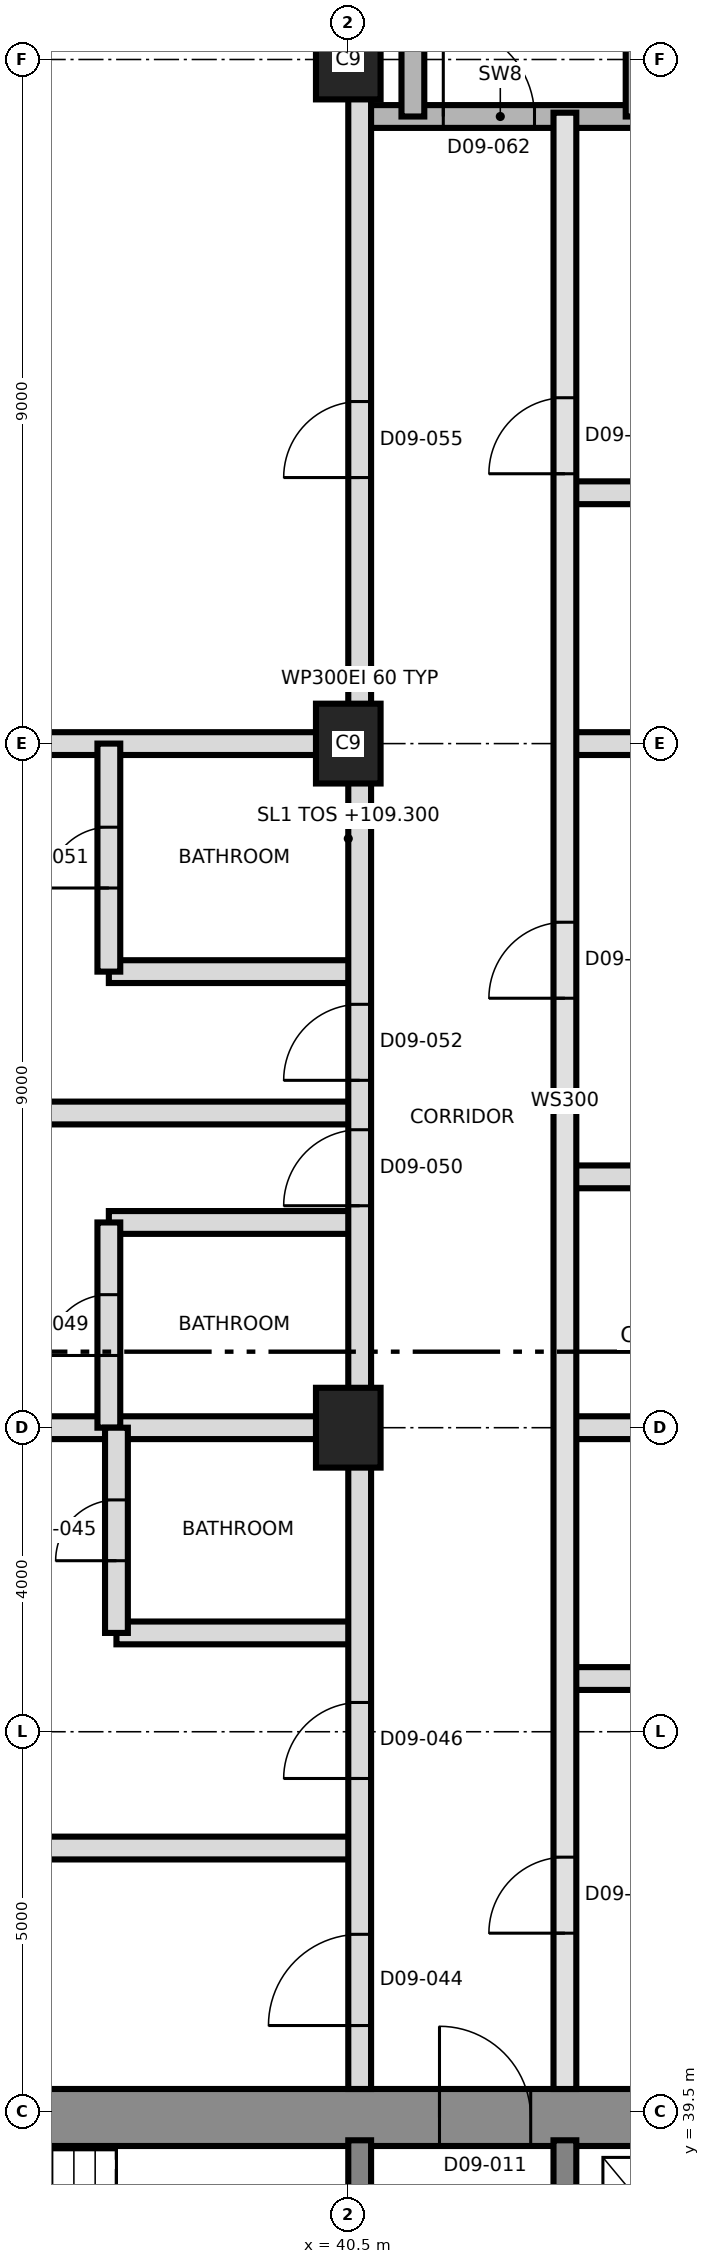
"""IFC4 building model, lengths in metres.
Left out: names, types, materials, properties, quantities, classifications, styles, units other than length and angle.
Written with IfcOpenShell. Run it as: python <this file> out.ifc"""

import sys

from ifc_helpers import new_model, si_unit, direction, frame, frame_2d, origin, origin_2d, place, context, subcontext, project, spatial, rectangle, extrude, element, fill, save


model = new_model("IFC4")
c1 = context("Model", 3, precision=1e-05, world=origin(), true_north=direction((0.0, 1.0)))
c2 = subcontext(c1, "Body", "Model", "MODEL_VIEW")
j1 = project(units=[si_unit("LENGTHUNIT", "METRE"), si_unit("PLANEANGLEUNIT", "RADIAN")], contexts=[c1])
p1 = place(None, origin())
s1 = spatial("IfcSite", under=j1, at=p1, CompositionType="ELEMENT")
p2 = place(p1, origin())
s2 = spatial("IfcBuilding", under=s1, at=p2, CompositionType="ELEMENT")
p3 = place(p2, frame((0.0, 0.0, 109.3)))
s3 = spatial("IfcBuildingStorey", under=s2, at=p3, CompositionType="ELEMENT", Elevation=109.3)
p4 = place(p3, frame((31.125, 39.425, 0.0), z_axis=(0.0, 0.0, 1.0), x_axis=(1.0, 0.0, 0.0)))
e1 = element("IfcWall", 1, at=p4, inside=s3, PredefinedType="SHEAR", context=c2, shape_type="SweptSolid", body=[
    extrude(rectangle(XDim=27.0, YDim=0.75, at=frame_2d((13.5, 0.0))), origin(), (0.0, 0.0, 1.0), 3.7),
])
p5 = place(p4, frame((10.575, 0.0, 0.0)))
e2 = element("IfcOpeningElement", 2, at=p5, cuts=e1, PredefinedType="OPENING", context=c2, shape_type="SweptSolid", body=[
    extrude(rectangle(XDim=1.2, YDim=2.1, at=frame_2d((0.6, 1.05))), frame((0.0, 0.385, 0.0), z_axis=(0.0, -1.0, 0.0), x_axis=(1.0, 0.0, 0.0)), (0.0, 0.0, 1.0), 0.77),
])
for number, where, z_axis, x_axis in (
    (3, (40.65, 33.5, 0.0), (0.0, 0.0, 1.0), (0.0, 1.0, 0.0)),
    (4, (43.35, 33.5, 0.0), (0.0, 0.0, 1.0), (0.0, 1.0, 0.0)),
):
    element("IfcWall", number, at=place(p3, frame(where, z_axis=z_axis, x_axis=x_axis)), inside=s3, PredefinedType="SHEAR", context=c2, shape_type="SweptSolid", body=[
        extrude(rectangle(XDim=5.625, YDim=0.3, at=frame_2d((2.812, 0.0))), origin(), (0.0, 0.0, 1.0), 3.7),
    ])
for number, where, z_axis, x_axis in (
    (5, (40.5, 48.5, 0.0), (0.0, 0.0, 1.0), (0.0, 1.0, 0.0)),
    (6, (40.5, 57.5, 0.0), (0.0, 0.0, 1.0), (0.0, 1.0, 0.0)),
    (7, (40.5, 66.5, 0.0), (0.0, 0.0, 1.0), (0.0, 1.0, 0.0)),
):
    element("IfcColumn", number, at=place(p3, frame(where, z_axis=z_axis, x_axis=x_axis)), inside=s3, PredefinedType="COLUMN", context=c2, shape_type="SweptSolid", body=[
        extrude(rectangle(XDim=1.05, YDim=0.85, at=origin_2d()), origin(), (0.0, 0.0, 1.0), 3.7),
    ])
p6 = place(p3, frame((30.35, 42.97, 0.0), z_axis=(0.0, 0.0, 1.0), x_axis=(1.0, 0.0, 0.0)))
e8 = element("IfcWall", 8, at=p6, inside=s3, PredefinedType="PARTITIONING", context=c2, shape_type="SweptSolid", body=[
    extrude(rectangle(XDim=10.3, YDim=0.3, at=frame_2d((5.15, 0.0))), origin(), (0.0, 0.0, 1.0), 3.4),
])
p7 = place(p3, frame((43.35, 45.2, 0.0), z_axis=(0.0, 0.0, 1.0), x_axis=(1.0, 0.0, 0.0)))
e9 = element("IfcWall", 9, at=p7, inside=s3, PredefinedType="PARTITIONING", context=c2, shape_type="SweptSolid", body=[
    extrude(rectangle(XDim=3.5, YDim=0.3, at=frame_2d((1.75, 0.0))), origin(), (0.0, 0.0, 1.0), 3.4),
])
p8 = place(p3, frame((37.45, 45.8, 0.0), z_axis=(0.0, 0.0, 1.0), x_axis=(1.0, 0.0, 0.0)))
e10 = element("IfcWall", 10, at=p8, inside=s3, PredefinedType="PARTITIONING", context=c2, shape_type="SweptSolid", body=[
    extrude(rectangle(XDim=3.2, YDim=0.3, at=frame_2d((1.6, 0.0))), origin(), (0.0, 0.0, 1.0), 3.4),
])
p9 = place(p3, frame((30.35, 48.5, 0.0), z_axis=(0.0, 0.0, 1.0), x_axis=(1.0, 0.0, 0.0)))
e11 = element("IfcWall", 11, at=p9, inside=s3, PredefinedType="PARTITIONING", context=c2, shape_type="SweptSolid", body=[
    extrude(rectangle(XDim=10.3, YDim=0.3, at=frame_2d((5.15, 0.0))), origin(), (0.0, 0.0, 1.0), 3.4),
])
p10 = place(p3, frame((43.35, 48.5, 0.0), z_axis=(0.0, 0.0, 1.0), x_axis=(1.0, 0.0, 0.0)))
e12 = element("IfcWall", 12, at=p10, inside=s3, PredefinedType="PARTITIONING", context=c2, shape_type="SweptSolid", body=[
    extrude(rectangle(XDim=7.48, YDim=0.3, at=frame_2d((3.74, 0.0))), origin(), (0.0, 0.0, 1.0), 3.4),
])
p11 = place(p3, frame((37.35, 51.2, 0.0), z_axis=(0.0, 0.0, 1.0), x_axis=(1.0, 0.0, 0.0)))
e13 = element("IfcWall", 13, at=p11, inside=s3, PredefinedType="PARTITIONING", context=c2, shape_type="SweptSolid", body=[
    extrude(rectangle(XDim=3.3, YDim=0.3, at=frame_2d((1.65, 0.0))), origin(), (0.0, 0.0, 1.0), 3.4),
])
p12 = place(p3, frame((43.35, 51.8, 0.0), z_axis=(0.0, 0.0, 1.0), x_axis=(1.0, 0.0, 0.0)))
e14 = element("IfcWall", 14, at=p12, inside=s3, PredefinedType="PARTITIONING", context=c2, shape_type="SweptSolid", body=[
    extrude(rectangle(XDim=3.5, YDim=0.3, at=frame_2d((1.75, 0.0))), origin(), (0.0, 0.0, 1.0), 3.4),
])
p13 = place(p3, frame((30.35, 52.64, 0.0), z_axis=(0.0, 0.0, 1.0), x_axis=(1.0, 0.0, 0.0)))
e15 = element("IfcWall", 15, at=p13, inside=s3, PredefinedType="PARTITIONING", context=c2, shape_type="SweptSolid", body=[
    extrude(rectangle(XDim=10.3, YDim=0.3, at=frame_2d((5.15, 0.0))), origin(), (0.0, 0.0, 1.0), 3.4),
])
p14 = place(p3, frame((37.35, 54.5, 0.0), z_axis=(0.0, 0.0, 1.0), x_axis=(1.0, 0.0, 0.0)))
e16 = element("IfcWall", 16, at=p14, inside=s3, PredefinedType="PARTITIONING", context=c2, shape_type="SweptSolid", body=[
    extrude(rectangle(XDim=3.3, YDim=0.3, at=frame_2d((1.65, 0.0))), origin(), (0.0, 0.0, 1.0), 3.4),
])
p15 = place(p3, frame((30.35, 57.5, 0.0), z_axis=(0.0, 0.0, 1.0), x_axis=(1.0, 0.0, 0.0)))
e17 = element("IfcWall", 17, at=p15, inside=s3, PredefinedType="PARTITIONING", context=c2, shape_type="SweptSolid", body=[
    extrude(rectangle(XDim=10.3, YDim=0.3, at=frame_2d((5.15, 0.0))), origin(), (0.0, 0.0, 1.0), 3.4),
])
p16 = place(p3, frame((43.35, 57.5, 0.0), z_axis=(0.0, 0.0, 1.0), x_axis=(1.0, 0.0, 0.0)))
e18 = element("IfcWall", 18, at=p16, inside=s3, PredefinedType="PARTITIONING", context=c2, shape_type="SweptSolid", body=[
    extrude(rectangle(XDim=7.48, YDim=0.3, at=frame_2d((3.74, 0.0))), origin(), (0.0, 0.0, 1.0), 3.4),
])
p17 = place(p3, frame((43.35, 60.8, 0.0), z_axis=(0.0, 0.0, 1.0), x_axis=(1.0, 0.0, 0.0)))
e19 = element("IfcWall", 19, at=p17, inside=s3, PredefinedType="PARTITIONING", context=c2, shape_type="SweptSolid", body=[
    extrude(rectangle(XDim=3.5, YDim=0.3, at=frame_2d((1.75, 0.0))), origin(), (0.0, 0.0, 1.0), 3.4),
])
p18 = place(p3, frame((40.65, 65.75, 0.0), z_axis=(0.0, 0.0, 1.0), x_axis=(1.0, 0.0, 0.0)))
e20 = element("IfcWall", 20, at=p18, inside=s3, PredefinedType="SHEAR", context=c2, shape_type="SweptSolid", body=[
    extrude(rectangle(XDim=3.7, YDim=0.3, at=frame_2d((1.85, 0.0))), origin(), (0.0, 0.0, 1.0), 3.4),
])
p19 = place(p18, frame((1.1, 0.0, 0.0)))
e21 = element("IfcOpeningElement", 21, at=p19, cuts=e20, PredefinedType="OPENING", context=c2, shape_type="SweptSolid", body=[
    extrude(rectangle(XDim=1.2, YDim=2.1, at=frame_2d((0.6, 1.05))), frame((0.0, 0.16, 0.0), z_axis=(0.0, -1.0, 0.0), x_axis=(1.0, 0.0, 0.0)), (0.0, 0.0, 1.0), 0.32),
])
p20 = place(p3, frame((37.35, 48.5, 0.0), z_axis=(0.0, 0.0, 1.0), x_axis=(0.0, 1.0, 0.0)))
e22 = element("IfcWall", 22, at=p20, inside=s3, PredefinedType="PARTITIONING", context=c2, shape_type="SweptSolid", body=[
    extrude(rectangle(XDim=2.7, YDim=0.3, at=frame_2d((1.35, 0.0))), origin(), (0.0, 0.0, 1.0), 3.4),
])
p21 = place(p20, frame((0.95, 0.0, 0.0)))
e23 = element("IfcOpeningElement", 23, at=p21, cuts=e22, PredefinedType="OPENING", context=c2, shape_type="SweptSolid", body=[
    extrude(rectangle(XDim=0.8, YDim=2.1, at=frame_2d((0.4, 1.05))), frame((0.0, 0.16, 0.0), z_axis=(0.0, -1.0, 0.0), x_axis=(1.0, 0.0, 0.0)), (0.0, 0.0, 1.0), 0.32),
])
p22 = place(p3, frame((37.35, 54.5, 0.0), z_axis=(0.0, 0.0, 1.0), x_axis=(0.0, 1.0, 0.0)))
e24 = element("IfcWall", 24, at=p22, inside=s3, PredefinedType="PARTITIONING", context=c2, shape_type="SweptSolid", body=[
    extrude(rectangle(XDim=3.0, YDim=0.3, at=frame_2d((1.5, 0.0))), origin(), (0.0, 0.0, 1.0), 3.4),
])
p23 = place(p22, frame((1.1, 0.0, 0.0)))
e25 = element("IfcOpeningElement", 25, at=p23, cuts=e24, PredefinedType="OPENING", context=c2, shape_type="SweptSolid", body=[
    extrude(rectangle(XDim=0.8, YDim=2.1, at=frame_2d((0.4, 1.05))), frame((0.0, 0.16, 0.0), z_axis=(0.0, -1.0, 0.0), x_axis=(1.0, 0.0, 0.0)), (0.0, 0.0, 1.0), 0.32),
])
p24 = place(p3, frame((37.45, 45.8, 0.0), z_axis=(0.0, 0.0, 1.0), x_axis=(0.0, 1.0, 0.0)))
e26 = element("IfcWall", 26, at=p24, inside=s3, PredefinedType="PARTITIONING", context=c2, shape_type="SweptSolid", body=[
    extrude(rectangle(XDim=2.7, YDim=0.3, at=frame_2d((1.35, 0.0))), origin(), (0.0, 0.0, 1.0), 3.4),
])
p25 = place(p24, frame((0.95, 0.0, 0.0)))
e27 = element("IfcOpeningElement", 27, at=p25, cuts=e26, PredefinedType="OPENING", context=c2, shape_type="SweptSolid", body=[
    extrude(rectangle(XDim=0.8, YDim=2.1, at=frame_2d((0.4, 1.05))), frame((0.0, 0.16, 0.0), z_axis=(0.0, -1.0, 0.0), x_axis=(1.0, 0.0, 0.0)), (0.0, 0.0, 1.0), 0.32),
])
p26 = place(p3, frame((40.65, 39.8, 0.0), z_axis=(0.0, 0.0, 1.0), x_axis=(0.0, 1.0, 0.0)))
e28 = element("IfcWall", 28, at=p26, inside=s3, PredefinedType="PARTITIONING", context=c2, shape_type="SweptSolid", body=[
    extrude(rectangle(XDim=37.09, YDim=0.3, at=frame_2d((18.545, 0.0))), origin(), (0.0, 0.0, 1.0), 3.4),
])
p27 = place(p26, frame((0.835, 0.0, 0.0)))
e29 = element("IfcOpeningElement", 29, at=p27, cuts=e28, PredefinedType="OPENING", context=c2, shape_type="SweptSolid", body=[
    extrude(rectangle(XDim=1.2, YDim=2.1, at=frame_2d((0.6, 1.05))), frame((0.0, 0.16, 0.0), z_axis=(0.0, -1.0, 0.0), x_axis=(1.0, 0.0, 0.0)), (0.0, 0.0, 1.0), 0.32),
])
p28 = place(p26, frame((4.085, 0.0, 0.0)))
e30 = element("IfcOpeningElement", 30, at=p28, cuts=e28, PredefinedType="OPENING", context=c2, shape_type="SweptSolid", body=[
    extrude(rectangle(XDim=1.0, YDim=2.1, at=frame_2d((0.5, 1.05))), frame((0.0, 0.16, 0.0), z_axis=(0.0, -1.0, 0.0), x_axis=(1.0, 0.0, 0.0)), (0.0, 0.0, 1.0), 0.32),
])
p29 = place(p26, frame((11.62, 0.0, 0.0)))
e31 = element("IfcOpeningElement", 31, at=p29, cuts=e28, PredefinedType="OPENING", context=c2, shape_type="SweptSolid", body=[
    extrude(rectangle(XDim=1.0, YDim=2.4, at=frame_2d((0.5, 1.2))), frame((0.0, 0.16, 0.0), z_axis=(0.0, -1.0, 0.0), x_axis=(1.0, 0.0, 0.0)), (0.0, 0.0, 1.0), 0.32),
])
p30 = place(p26, frame((13.27, 0.0, 0.0)))
e32 = element("IfcOpeningElement", 32, at=p30, cuts=e28, PredefinedType="OPENING", context=c2, shape_type="SweptSolid", body=[
    extrude(rectangle(XDim=1.0, YDim=2.4, at=frame_2d((0.5, 1.2))), frame((0.0, 0.16, 0.0), z_axis=(0.0, -1.0, 0.0), x_axis=(1.0, 0.0, 0.0)), (0.0, 0.0, 1.0), 0.32),
])
p31 = place(p26, frame((21.2, 0.0, 0.0)))
e33 = element("IfcOpeningElement", 33, at=p31, cuts=e28, PredefinedType="OPENING", context=c2, shape_type="SweptSolid", body=[
    extrude(rectangle(XDim=1.0, YDim=2.4, at=frame_2d((0.5, 1.2))), frame((0.0, 0.16, 0.0), z_axis=(0.0, -1.0, 0.0), x_axis=(1.0, 0.0, 0.0)), (0.0, 0.0, 1.0), 0.32),
])
p32 = place(p3, frame((41.35, 65.75, 0.0), z_axis=(0.0, 0.0, 1.0), x_axis=(0.0, 1.0, 0.0)))
e34 = element("IfcWall", 34, at=p32, inside=s3, PredefinedType="SHEAR", context=c2, shape_type="SweptSolid", body=[
    extrude(rectangle(XDim=8.85, YDim=0.3, at=frame_2d((4.425, 0.0))), origin(), (0.0, 0.0, 1.0), 3.4),
])
p33 = place(p3, frame((43.35, 39.8, 0.0), z_axis=(0.0, 0.0, 1.0), x_axis=(0.0, 1.0, 0.0)))
e35 = element("IfcWall", 35, at=p33, inside=s3, PredefinedType="SOLIDWALL", context=c2, shape_type="SweptSolid", body=[
    extrude(rectangle(XDim=26.0, YDim=0.3, at=frame_2d((13.0, 0.0))), origin(), (0.0, 0.0, 1.0), 3.4),
])
p34 = place(p33, frame((2.05, 0.0, 0.0)))
e36 = element("IfcOpeningElement", 36, at=p34, cuts=e35, PredefinedType="OPENING", context=c2, shape_type="SweptSolid", body=[
    extrude(rectangle(XDim=1.0, YDim=2.4, at=frame_2d((0.5, 1.2))), frame((0.0, 0.16, 0.0), z_axis=(0.0, -1.0, 0.0), x_axis=(1.0, 0.0, 0.0)), (0.0, 0.0, 1.0), 0.32),
])
p35 = place(p33, frame((14.35, 0.0, 0.0)))
e37 = element("IfcOpeningElement", 37, at=p35, cuts=e35, PredefinedType="OPENING", context=c2, shape_type="SweptSolid", body=[
    extrude(rectangle(XDim=1.0, YDim=2.4, at=frame_2d((0.5, 1.2))), frame((0.0, 0.16, 0.0), z_axis=(0.0, -1.0, 0.0), x_axis=(1.0, 0.0, 0.0)), (0.0, 0.0, 1.0), 0.32),
])
p36 = place(p33, frame((21.25, 0.0, 0.0)))
e38 = element("IfcOpeningElement", 38, at=p36, cuts=e35, PredefinedType="OPENING", context=c2, shape_type="SweptSolid", body=[
    extrude(rectangle(XDim=1.0, YDim=2.4, at=frame_2d((0.5, 1.2))), frame((0.0, 0.16, 0.0), z_axis=(0.0, -1.0, 0.0), x_axis=(1.0, 0.0, 0.0)), (0.0, 0.0, 1.0), 0.32),
])
p37 = place(p3, frame((44.3, 65.75, 0.0), z_axis=(0.0, 0.0, 1.0), x_axis=(0.0, 1.0, 0.0)))
e39 = element("IfcWall", 39, at=p37, inside=s3, PredefinedType="SHEAR", context=c2, shape_type="SweptSolid", body=[
    extrude(rectangle(XDim=8.85, YDim=0.3, at=frame_2d((4.425, 0.0))), origin(), (0.0, 0.0, 1.0), 3.4),
])
p38 = place(p5, origin())
e40 = element("IfcDoor", 40, at=p38, inside=s3, OperationType="SINGLE_SWING_RIGHT", PredefinedType="DOOR", context=c2, shape_type="SweptSolid", body=[
    extrude(rectangle(XDim=1.2, YDim=2.1, at=frame_2d((0.6, 1.05))), frame((0.0, 0.025, 0.0), z_axis=(0.0, -1.0, 0.0), x_axis=(1.0, 0.0, 0.0)), (0.0, 0.0, 1.0), 0.05),
])
fill(e2, e40)
p39 = place(p34, origin())
e41 = element("IfcDoor", 41, at=p39, inside=s3, OperationType="SINGLE_SWING_LEFT", PredefinedType="DOOR", context=c2, shape_type="SweptSolid", body=[
    extrude(rectangle(XDim=1.0, YDim=2.4, at=frame_2d((0.5, 1.2))), frame((0.0, 0.025, 0.0), z_axis=(0.0, -1.0, 0.0), x_axis=(1.0, 0.0, 0.0)), (0.0, 0.0, 1.0), 0.05),
])
fill(e36, e41)
p40 = place(p27, origin())
e42 = element("IfcDoor", 42, at=p40, inside=s3, OperationType="SINGLE_SWING_RIGHT", PredefinedType="DOOR", context=c2, shape_type="SweptSolid", body=[
    extrude(rectangle(XDim=1.2, YDim=2.1, at=frame_2d((0.6, 1.05))), frame((0.0, 0.025, 0.0), z_axis=(0.0, -1.0, 0.0), x_axis=(1.0, 0.0, 0.0)), (0.0, 0.0, 1.0), 0.05),
])
fill(e29, e42)
p41 = place(p25, origin())
e43 = element("IfcDoor", 43, at=p41, inside=s3, OperationType="SINGLE_SWING_LEFT", PredefinedType="DOOR", context=c2, shape_type="SweptSolid", body=[
    extrude(rectangle(XDim=0.8, YDim=2.1, at=frame_2d((0.4, 1.05))), frame((0.0, 0.025, 0.0), z_axis=(0.0, -1.0, 0.0), x_axis=(1.0, 0.0, 0.0)), (0.0, 0.0, 1.0), 0.05),
])
fill(e27, e43)
p42 = place(p28, origin())
e44 = element("IfcDoor", 44, at=p42, inside=s3, OperationType="SINGLE_SWING_LEFT", PredefinedType="DOOR", context=c2, shape_type="SweptSolid", body=[
    extrude(rectangle(XDim=1.0, YDim=2.1, at=frame_2d((0.5, 1.05))), frame((0.0, 0.025, 0.0), z_axis=(0.0, -1.0, 0.0), x_axis=(1.0, 0.0, 0.0)), (0.0, 0.0, 1.0), 0.05),
])
fill(e30, e44)
p43 = place(p35, origin())
e45 = element("IfcDoor", 45, at=p43, inside=s3, OperationType="SINGLE_SWING_RIGHT", PredefinedType="DOOR", context=c2, shape_type="SweptSolid", body=[
    extrude(rectangle(XDim=1.0, YDim=2.4, at=frame_2d((0.5, 1.2))), frame((0.0, 0.025, 0.0), z_axis=(0.0, -1.0, 0.0), x_axis=(1.0, 0.0, 0.0)), (0.0, 0.0, 1.0), 0.05),
])
fill(e37, e45)
p44 = place(p21, origin())
e46 = element("IfcDoor", 46, at=p44, inside=s3, OperationType="SINGLE_SWING_RIGHT", PredefinedType="DOOR", context=c2, shape_type="SweptSolid", body=[
    extrude(rectangle(XDim=0.8, YDim=2.1, at=frame_2d((0.4, 1.05))), frame((0.0, 0.025, 0.0), z_axis=(0.0, -1.0, 0.0), x_axis=(1.0, 0.0, 0.0)), (0.0, 0.0, 1.0), 0.05),
])
fill(e23, e46)
p45 = place(p29, origin())
e47 = element("IfcDoor", 47, at=p45, inside=s3, OperationType="SINGLE_SWING_LEFT", PredefinedType="DOOR", context=c2, shape_type="SweptSolid", body=[
    extrude(rectangle(XDim=1.0, YDim=2.4, at=frame_2d((0.5, 1.2))), frame((0.0, 0.025, 0.0), z_axis=(0.0, -1.0, 0.0), x_axis=(1.0, 0.0, 0.0)), (0.0, 0.0, 1.0), 0.05),
])
fill(e31, e47)
p46 = place(p23, origin())
e48 = element("IfcDoor", 48, at=p46, inside=s3, OperationType="SINGLE_SWING_LEFT", PredefinedType="DOOR", context=c2, shape_type="SweptSolid", body=[
    extrude(rectangle(XDim=0.8, YDim=2.1, at=frame_2d((0.4, 1.05))), frame((0.0, 0.025, 0.0), z_axis=(0.0, -1.0, 0.0), x_axis=(1.0, 0.0, 0.0)), (0.0, 0.0, 1.0), 0.05),
])
fill(e25, e48)
p47 = place(p30, origin())
e49 = element("IfcDoor", 49, at=p47, inside=s3, OperationType="SINGLE_SWING_LEFT", PredefinedType="DOOR", context=c2, shape_type="SweptSolid", body=[
    extrude(rectangle(XDim=1.0, YDim=2.4, at=frame_2d((0.5, 1.2))), frame((0.0, 0.025, 0.0), z_axis=(0.0, -1.0, 0.0), x_axis=(1.0, 0.0, 0.0)), (0.0, 0.0, 1.0), 0.05),
])
fill(e32, e49)
p48 = place(p36, origin())
e50 = element("IfcDoor", 50, at=p48, inside=s3, OperationType="SINGLE_SWING_RIGHT", PredefinedType="DOOR", context=c2, shape_type="SweptSolid", body=[
    extrude(rectangle(XDim=1.0, YDim=2.4, at=frame_2d((0.5, 1.2))), frame((0.0, 0.025, 0.0), z_axis=(0.0, -1.0, 0.0), x_axis=(1.0, 0.0, 0.0)), (0.0, 0.0, 1.0), 0.05),
])
fill(e38, e50)
p49 = place(p31, origin())
e51 = element("IfcDoor", 51, at=p49, inside=s3, OperationType="SINGLE_SWING_LEFT", PredefinedType="DOOR", context=c2, shape_type="SweptSolid", body=[
    extrude(rectangle(XDim=1.0, YDim=2.4, at=frame_2d((0.5, 1.2))), frame((0.0, 0.025, 0.0), z_axis=(0.0, -1.0, 0.0), x_axis=(1.0, 0.0, 0.0)), (0.0, 0.0, 1.0), 0.05),
])
fill(e33, e51)
p50 = place(p19, origin())
e52 = element("IfcDoor", 52, at=p50, inside=s3, OperationType="SINGLE_SWING_RIGHT", PredefinedType="DOOR", context=c2, shape_type="SweptSolid", body=[
    extrude(rectangle(XDim=1.2, YDim=2.1, at=frame_2d((0.6, 1.05))), frame((0.0, 0.025, 0.0), z_axis=(0.0, -1.0, 0.0), x_axis=(1.0, 0.0, 0.0)), (0.0, 0.0, 1.0), 0.05),
])
fill(e21, e52)
save(model, sys.argv[1])
